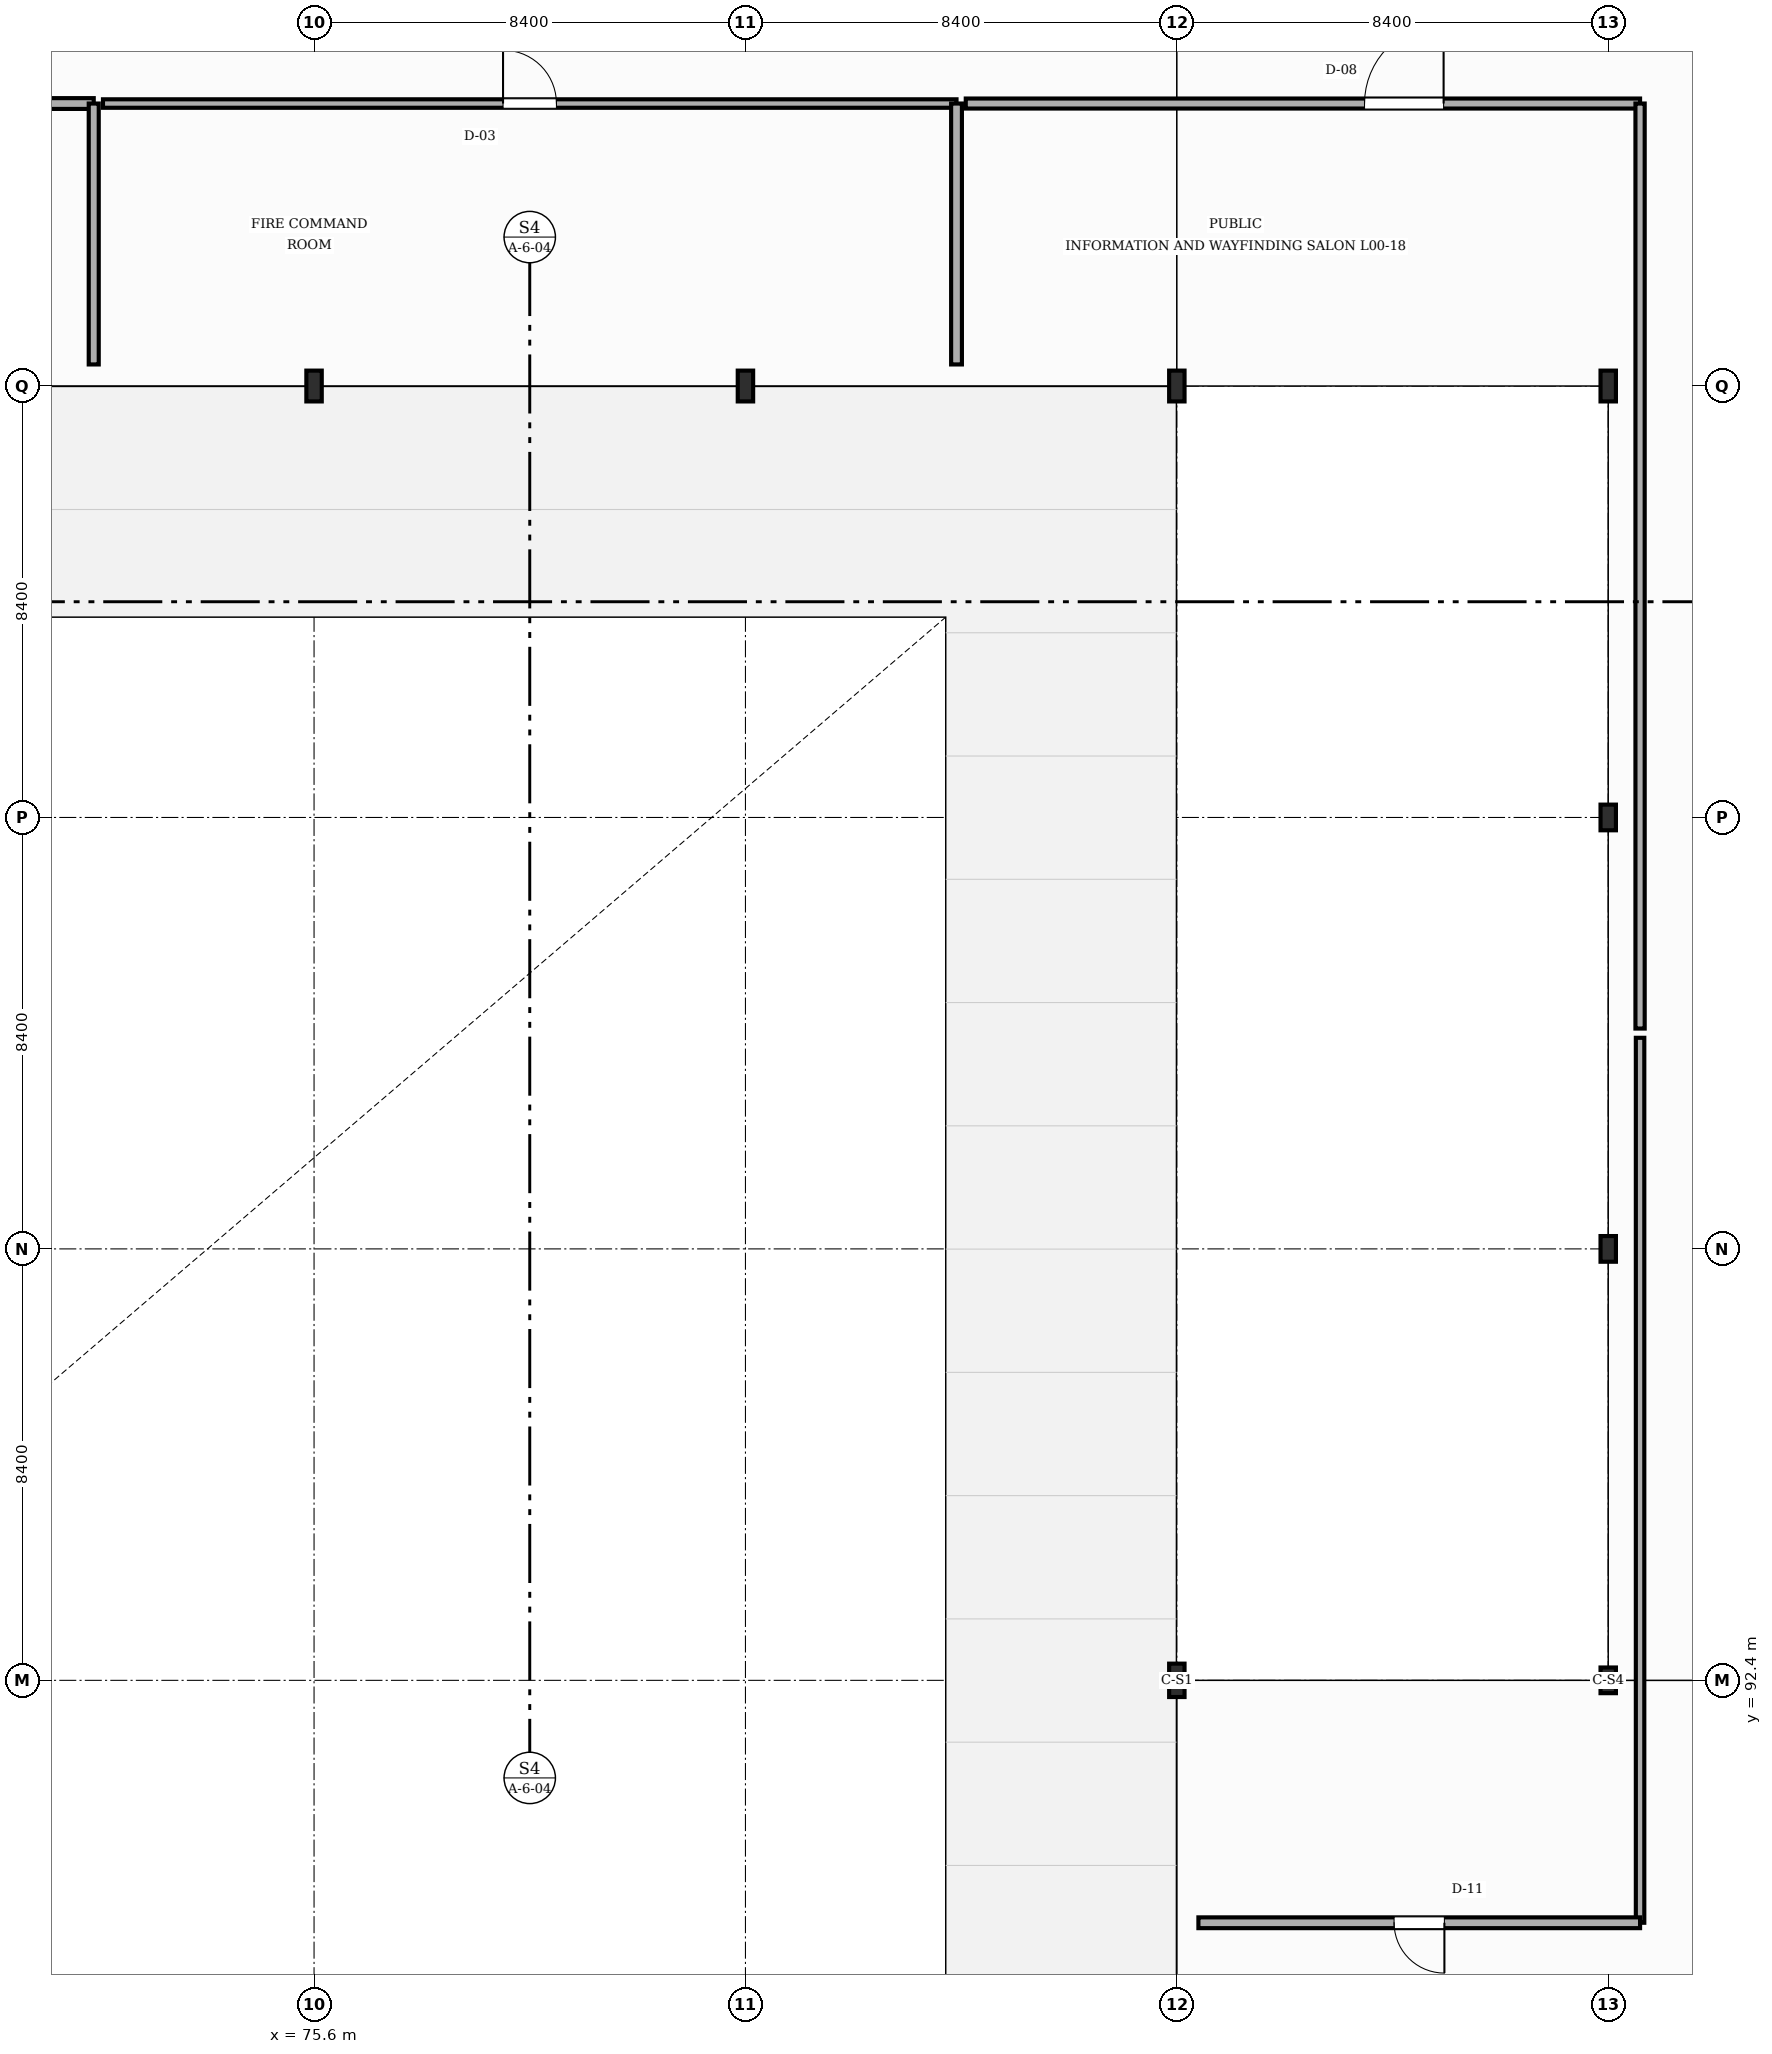
"""IFC4 building model, lengths in metres.
Left out: names, types, materials, properties, quantities, classifications, styles, units other than length and angle.
Written with IfcOpenShell. Run it as: python <this file> out.ifc"""

import sys

from ifc_helpers import new_model, si_unit, direction, frame, frame_2d, origin, origin_2d, place, context, subcontext, project, spatial, rectangle, i_section, extrude, element, fill, save


model = new_model("IFC4")
c1 = context("Model", 3, precision=1e-05, world=origin(), true_north=direction((0.0, 1.0)))
c2 = subcontext(c1, "Body", "Model", "MODEL_VIEW")
j1 = project(units=[si_unit("LENGTHUNIT", "METRE"), si_unit("PLANEANGLEUNIT", "RADIAN")], contexts=[c1])
p1 = place(None, origin())
s1 = spatial("IfcSite", under=j1, at=p1, CompositionType="ELEMENT")
p2 = place(p1, origin())
s2 = spatial("IfcBuilding", under=s1, at=p2, CompositionType="ELEMENT")
p3 = place(p2, origin())
s3 = spatial("IfcBuildingStorey", under=s2, at=p3, CompositionType="ELEMENT", Elevation=0.0)
for number, where, z_axis, x_axis in (
    (1, (75.6, 117.6, 0.0), (0.0, 0.0, 1.0), (1.0, 0.0, 0.0)),
    (2, (84.0, 117.6, 0.0), (0.0, 0.0, 1.0), (1.0, 0.0, 0.0)),
):
    element("IfcColumn", number, at=place(p3, frame(where, z_axis=z_axis, x_axis=x_axis)), inside=s3, PredefinedType="COLUMN", context=c2, shape_type="SweptSolid", body=[
        extrude(i_section(OverallWidth=0.3, OverallDepth=0.6, WebThickness=0.015, FlangeThickness=0.03, FilletRadius=0.027, at=origin_2d()), origin(), (0.0, 0.0, 1.0), 5.4),
    ])
p4 = place(p3, frame((92.4, 92.4, 0.0), z_axis=(0.0, 0.0, 1.0), x_axis=(1.0, 0.0, 0.0)))
e3 = element("IfcColumn", 3, at=p4, inside=s3, PredefinedType="COLUMN", context=c2, shape_type="SweptSolid", body=[
    extrude(i_section(OverallWidth=0.3, OverallDepth=0.65, WebThickness=0.016, FlangeThickness=0.031, FilletRadius=0.027, at=origin_2d()), origin(), (0.0, 0.0, 1.0), 5.4),
])
p5 = place(p3, frame((92.4, 117.6, 0.0), z_axis=(0.0, 0.0, 1.0), x_axis=(1.0, 0.0, 0.0)))
e4 = element("IfcColumn", 4, at=p5, inside=s3, PredefinedType="COLUMN", context=c2, shape_type="SweptSolid", body=[
    extrude(i_section(OverallWidth=0.3, OverallDepth=0.6, WebThickness=0.015, FlangeThickness=0.03, FilletRadius=0.027, at=origin_2d()), origin(), (0.0, 0.0, 1.0), 5.4),
])
for number, where, z_axis, x_axis in (
    (5, (100.8, 92.4, 0.0), (0.0, 0.0, 1.0), (1.0, 0.0, 0.0)),
    (6, (100.8, 100.8, 0.0), (0.0, 0.0, 1.0), (1.0, 0.0, 0.0)),
    (7, (100.8, 109.2, 0.0), (0.0, 0.0, 1.0), (1.0, 0.0, 0.0)),
):
    element("IfcColumn", number, at=place(p3, frame(where, z_axis=z_axis, x_axis=x_axis)), inside=s3, PredefinedType="COLUMN", context=c2, shape_type="SweptSolid", body=[
        extrude(i_section(OverallWidth=0.3, OverallDepth=0.5, WebThickness=0.014, FlangeThickness=0.028, FilletRadius=0.027, at=origin_2d()), origin(), (0.0, 0.0, 1.0), 5.4),
    ])
p6 = place(p3, frame((100.8, 117.6, 0.0), z_axis=(0.0, 0.0, 1.0), x_axis=(1.0, 0.0, 0.0)))
e8 = element("IfcColumn", 8, at=p6, inside=s3, PredefinedType="COLUMN", context=c2, shape_type="SweptSolid", body=[
    extrude(i_section(OverallWidth=0.3, OverallDepth=0.6, WebThickness=0.015, FlangeThickness=0.03, FilletRadius=0.027, at=origin_2d()), origin(), (0.0, 0.0, 1.0), 5.4),
])
p7 = place(p3, frame((54.86, 123.1, -0.004), z_axis=(0.0, 0.0, 1.0), x_axis=(1.0, 0.0, 0.0)))
e9 = element("IfcWall", 9, at=p7, inside=s3, PredefinedType="STANDARD", context=c2, shape_type="SweptSolid", body=[
    extrude(rectangle(XDim=16.45, YDim=0.21, at=frame_2d((8.225, 0.0))), origin(), (0.0, 0.0, 1.0), 5.179),
])
p8 = place(p7, frame((7.585, 0.0, 0.0)))
e10 = element("IfcOpeningElement", 10, at=p8, cuts=e9, PredefinedType="OPENING", context=c2, shape_type="SweptSolid", body=[
    extrude(rectangle(XDim=1.28, YDim=2.3, at=frame_2d((0.64, 1.15))), frame((0.0, 0.115, 0.0), z_axis=(0.0, -1.0, 0.0), x_axis=(1.0, 0.0, 0.0)), (0.0, 0.0, 1.0), 0.23),
])
p9 = place(p3, frame((71.31, 123.1, -0.004), z_axis=(0.0, 0.0, 1.0), x_axis=(0.0, -1.0, 0.0)))
e11 = element("IfcWall", 11, at=p9, inside=s3, PredefinedType="STANDARD", context=c2, shape_type="SweptSolid", body=[
    extrude(rectangle(XDim=5.08, YDim=0.195, at=frame_2d((2.54, 0.0))), origin(), (0.0, 0.0, 1.0), 5.179),
])
p10 = place(p3, frame((71.49, 123.1, -0.004), z_axis=(0.0, 0.0, 1.0), x_axis=(1.0, 0.0, 0.0)))
e12 = element("IfcWall", 12, at=p10, inside=s3, PredefinedType="STANDARD", context=c2, shape_type="SweptSolid", body=[
    extrude(rectangle(XDim=16.62, YDim=0.165, at=frame_2d((8.31, 0.0))), origin(), (0.0, 0.0, 1.0), 5.179),
])
p11 = place(p10, frame((7.79, 0.0, 0.0)))
e13 = element("IfcOpeningElement", 13, at=p11, cuts=e12, PredefinedType="OPENING", context=c2, shape_type="SweptSolid", body=[
    extrude(rectangle(XDim=1.04, YDim=2.06, at=frame_2d((0.52, 1.03))), frame((0.0, 0.093, 0.0), z_axis=(0.0, -1.0, 0.0), x_axis=(1.0, 0.0, 0.0)), (0.0, 0.0, 1.0), 0.185),
])
p12 = place(p3, frame((88.11, 123.1, -0.004), z_axis=(0.0, 0.0, 1.0), x_axis=(0.0, -1.0, 0.0)))
e14 = element("IfcWall", 14, at=p12, inside=s3, PredefinedType="STANDARD", context=c2, shape_type="SweptSolid", body=[
    extrude(rectangle(XDim=5.08, YDim=0.21, at=frame_2d((2.54, 0.0))), origin(), (0.0, 0.0, 1.0), 5.179),
])
p13 = place(p3, frame((88.29, 123.1, -0.004), z_axis=(0.0, 0.0, 1.0), x_axis=(1.0, 0.0, 0.0)))
e15 = element("IfcWall", 15, at=p13, inside=s3, PredefinedType="STANDARD", context=c2, shape_type="SweptSolid", body=[
    extrude(rectangle(XDim=13.13, YDim=0.195, at=frame_2d((6.565, 0.0))), origin(), (0.0, 0.0, 1.0), 5.179),
])
p14 = place(p13, frame((7.764, 0.0, 0.0)))
e16 = element("IfcOpeningElement", 16, at=p14, cuts=e15, PredefinedType="OPENING", context=c2, shape_type="SweptSolid", body=[
    extrude(rectangle(XDim=1.54, YDim=2.06, at=frame_2d((0.77, 1.03))), frame((0.0, 0.107, 0.0), z_axis=(0.0, -1.0, 0.0), x_axis=(1.0, 0.0, 0.0)), (0.0, 0.0, 1.0), 0.215),
])
p15 = place(p3, frame((101.42, 123.1, -0.004), z_axis=(0.0, 0.0, 1.0), x_axis=(0.0, -1.0, 0.0)))
e17 = element("IfcWall", 17, at=p15, inside=s3, PredefinedType="STANDARD", context=c2, shape_type="SweptSolid", body=[
    extrude(rectangle(XDim=18.01, YDim=0.18, at=frame_2d((9.005, 0.0))), origin(), (0.0, 0.0, 1.0), 5.179),
])
p16 = place(p3, frame((101.42, 104.91, -0.004), z_axis=(0.0, 0.0, 1.0), x_axis=(0.0, -1.0, 0.0)))
e18 = element("IfcWall", 18, at=p16, inside=s3, PredefinedType="STANDARD", context=c2, shape_type="SweptSolid", body=[
    extrude(rectangle(XDim=17.23, YDim=0.165, at=frame_2d((8.615, 0.0))), origin(), (0.0, 0.0, 1.0), 5.179),
])
p17 = place(p3, frame((101.42, 87.68, -0.004), z_axis=(0.0, 0.0, 1.0), x_axis=(-1.0, 0.0, 0.0)))
e19 = element("IfcWall", 19, at=p17, inside=s3, PredefinedType="STANDARD", context=c2, shape_type="SweptSolid", body=[
    extrude(rectangle(XDim=8.6, YDim=0.21, at=frame_2d((4.3, 0.0))), origin(), (0.0, 0.0, 1.0), 5.179),
])
p18 = place(p17, frame((3.81, 0.0, 0.0)))
e20 = element("IfcOpeningElement", 20, at=p18, cuts=e19, PredefinedType="OPENING", context=c2, shape_type="SweptSolid", body=[
    extrude(rectangle(XDim=0.98, YDim=2.14, at=frame_2d((0.49, 1.07))), frame((0.0, 0.115, 0.0), z_axis=(0.0, -1.0, 0.0), x_axis=(1.0, 0.0, 0.0)), (0.0, 0.0, 1.0), 0.23),
])
p19 = place(p11, origin())
e21 = element("IfcDoor", 21, at=p19, inside=s3, OperationType="SINGLE_SWING_LEFT", PredefinedType="DOOR", context=c2, shape_type="SweptSolid", body=[
    extrude(rectangle(XDim=1.04, YDim=2.06, at=frame_2d((0.52, 1.03))), frame((0.0, 0.025, 0.0), z_axis=(0.0, -1.0, 0.0), x_axis=(1.0, 0.0, 0.0)), (0.0, 0.0, 1.0), 0.05),
])
fill(e13, e21)
p20 = place(p14, origin())
e22 = element("IfcDoor", 22, at=p20, inside=s3, OperationType="SINGLE_SWING_RIGHT", PredefinedType="DOOR", context=c2, shape_type="SweptSolid", body=[
    extrude(rectangle(XDim=1.54, YDim=2.06, at=frame_2d((0.77, 1.03))), frame((0.0, 0.025, 0.0), z_axis=(0.0, -1.0, 0.0), x_axis=(1.0, 0.0, 0.0)), (0.0, 0.0, 1.0), 0.05),
])
fill(e16, e22)
p21 = place(p18, origin())
e23 = element("IfcDoor", 23, at=p21, inside=s3, OperationType="SINGLE_SWING_LEFT", PredefinedType="DOOR", context=c2, shape_type="SweptSolid", body=[
    extrude(rectangle(XDim=0.98, YDim=2.14, at=frame_2d((0.49, 1.07))), frame((0.0, 0.025, 0.0), z_axis=(0.0, -1.0, 0.0), x_axis=(1.0, 0.0, 0.0)), (0.0, 0.0, 1.0), 0.05),
])
fill(e20, e23)
save(model, sys.argv[1])
